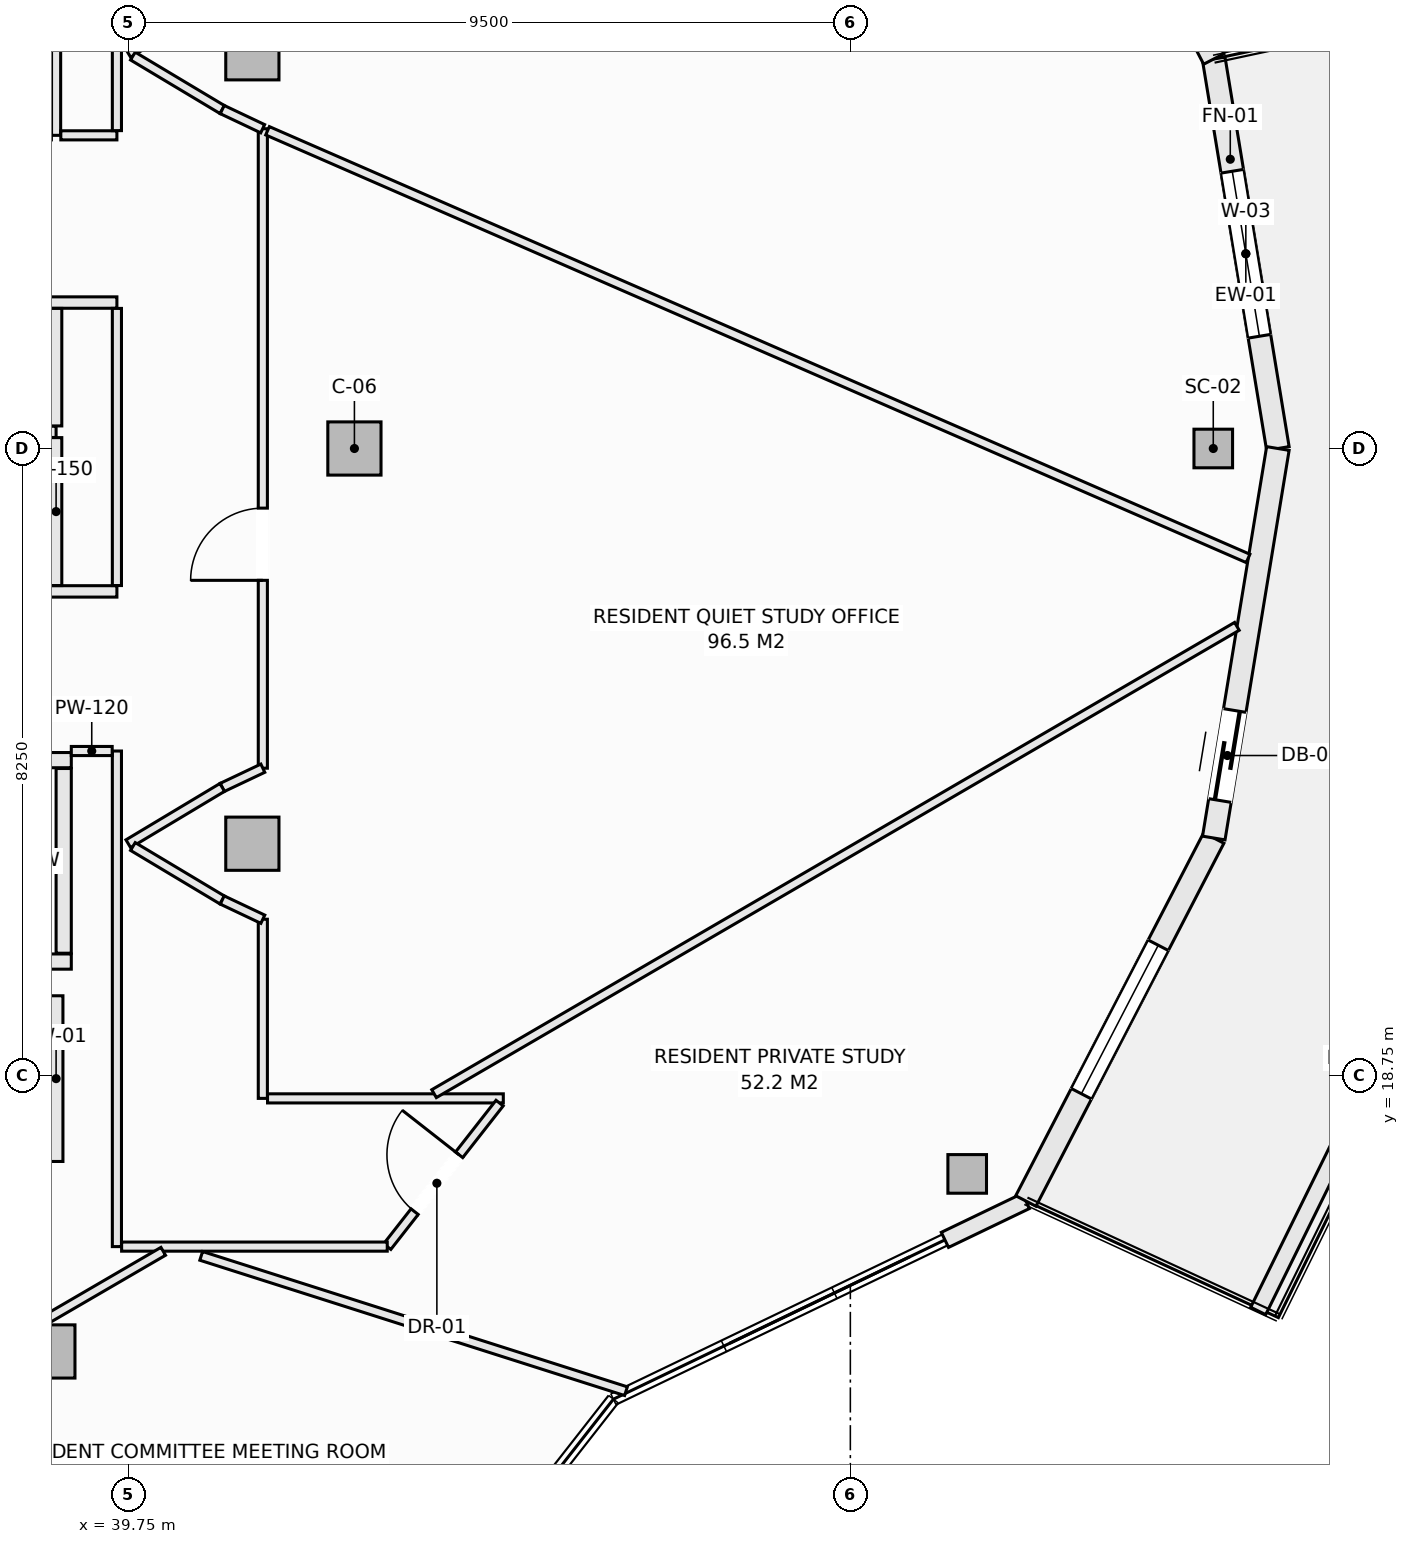
"""IFC4 building model, lengths in metres.
Left out: names, types, materials, properties, quantities, classifications, styles, units other than length and angle.
Written with IfcOpenShell. Run it as: python <this file> out.ifc"""

import sys

from ifc_helpers import new_model, si_unit, direction, frame, frame_2d, origin, origin_2d, place, context, subcontext, project, spatial, rectangle, hollow_rectangle, extrude, element, fill, save


model = new_model("IFC4")
c1 = context("Model", 3, precision=1e-05, world=origin(), true_north=direction((0.0, 1.0)))
c2 = subcontext(c1, "Body", "Model", "MODEL_VIEW")
j1 = project(units=[si_unit("LENGTHUNIT", "METRE"), si_unit("PLANEANGLEUNIT", "RADIAN")], contexts=[c1])
p1 = place(None, origin())
s1 = spatial("IfcSite", under=j1, at=p1, CompositionType="ELEMENT")
p2 = place(p1, origin())
s2 = spatial("IfcBuilding", under=s1, at=p2, CompositionType="ELEMENT")
p3 = place(p2, frame((0.0, 0.0, 226.1)))
s3 = spatial("IfcBuildingStorey", under=s2, at=p3, CompositionType="ELEMENT", Elevation=226.1)
for number, where, z_axis, x_axis in (
    (1, (54.025, 27.0, -0.27), (0.0, 0.0, 1.0), (1.0, 0.0, 0.0)),
    (2, (50.787, 17.456, -0.27), (0.0, 0.0, 1.0), (1.0, 0.0, 0.0)),
):
    element("IfcColumn", number, at=place(p3, frame(where, z_axis=z_axis, x_axis=x_axis)), inside=s3, PredefinedType="COLUMN", context=c2, shape_type="SweptSolid", body=[
        extrude(hollow_rectangle(XDim=0.508, YDim=0.508, WallThickness=0.019, at=origin_2d()), origin(), (0.0, 0.0, 1.0), 3.3),
    ])
for number, where, z_axis, x_axis in (
    (3, (42.725, 27.0, -0.27), (0.0, 0.0, 1.0), (1.0, 0.0, 0.0)),
    (4, (41.382, 32.199, -0.27), (0.0, 0.0, 1.0), (1.0, 0.0, 0.0)),
    (5, (38.698, 15.121, -0.27), (0.0, 0.0, 1.0), (1.0, 0.0, 0.0)),
    (6, (41.382, 21.801, -0.27), (0.0, 0.0, 1.0), (1.0, 0.0, 0.0)),
):
    element("IfcColumn", number, at=place(p3, frame(where, z_axis=z_axis, x_axis=x_axis)), inside=s3, PredefinedType="COLUMN", context=c2, shape_type="SweptSolid", body=[
        extrude(rectangle(XDim=0.7, YDim=0.7, at=origin_2d()), origin(), (0.0, 0.0, 1.0), 3.3),
    ])
p4 = place(p3, frame((54.032, 32.125, 0.0), z_axis=(0.0, 0.0, 1.0), x_axis=(0.16237087798, -0.986729799886, 0.0)))
e7 = element("IfcWall", 7, at=p4, inside=s3, PredefinedType="SOLIDWALL", context=c2, shape_type="SweptSolid", body=[
    extrude(rectangle(XDim=5.193, YDim=0.3, at=frame_2d((2.597, 0.0))), origin(), (0.0, 0.0, 1.0), 2.605),
])
p5 = place(p4, frame((1.497, 0.0, 0.72)))
e8 = element("IfcOpeningElement", 8, at=p5, cuts=e7, PredefinedType="OPENING", context=c2, shape_type="SweptSolid", body=[
    extrude(rectangle(XDim=2.2, YDim=1.65, at=frame_2d((1.1, 0.825))), frame((0.0, 0.16, 0.0), z_axis=(0.0, -1.0, 0.0), x_axis=(1.0, 0.0, 0.0)), (0.0, 0.0, 1.0), 0.32),
])
p6 = place(p3, frame((51.559, 36.9, 0.0), z_axis=(0.0, 0.0, 1.0), x_axis=(0.459808219482, -0.888018243786, 0.0)))
e9 = element("IfcWall", 9, at=p6, inside=s3, PredefinedType="SOLIDWALL", context=c2, shape_type="SweptSolid", body=[
    extrude(rectangle(XDim=5.378, YDim=0.3, at=frame_2d((2.689, 0.0))), origin(), (0.0, 0.0, 1.0), 2.605),
])
p7 = place(p6, frame((1.589, 0.0, 0.72)))
e10 = element("IfcOpeningElement", 10, at=p7, cuts=e9, PredefinedType="OPENING", context=c2, shape_type="SweptSolid", body=[
    extrude(rectangle(XDim=2.2, YDim=1.65, at=frame_2d((1.1, 0.825))), frame((0.0, 0.16, 0.0), z_axis=(0.0, -1.0, 0.0), x_axis=(1.0, 0.0, 0.0)), (0.0, 0.0, 1.0), 0.32),
])
p8 = place(p3, frame((50.494, 16.588, 0.0), z_axis=(0.0, 0.0, 1.0), x_axis=(0.901342408365, 0.433107218692, 0.0)))
e11 = element("IfcWall", 11, at=p8, inside=s3, PredefinedType="SOLIDWALL", context=c2, shape_type="SweptSolid", body=[
    extrude(rectangle(XDim=1.181, YDim=0.22, at=frame_2d((0.591, 0.0))), origin(), (0.0, 0.0, 1.0), 2.605),
])
p9 = place(p3, frame((51.559, 17.1, 0.0), z_axis=(0.0, 0.0, 1.0), x_axis=(0.459808219482, 0.888018243786, 0.0)))
e12 = element("IfcWall", 12, at=p9, inside=s3, PredefinedType="SOLIDWALL", context=c2, shape_type="SweptSolid", body=[
    extrude(rectangle(XDim=5.378, YDim=0.3, at=frame_2d((2.689, 0.0))), origin(), (0.0, 0.0, 1.0), 2.605),
])
p10 = place(p9, frame((1.589, 0.0, 0.72)))
e13 = element("IfcOpeningElement", 13, at=p10, cuts=e12, PredefinedType="OPENING", context=c2, shape_type="SweptSolid", body=[
    extrude(rectangle(XDim=2.2, YDim=1.65, at=frame_2d((1.1, 0.825))), frame((0.0, 0.16, 0.0), z_axis=(0.0, -1.0, 0.0), x_axis=(1.0, 0.0, 0.0)), (0.0, 0.0, 1.0), 0.32),
])
p11 = place(p3, frame((54.032, 21.875, 0.0), z_axis=(0.0, 0.0, 1.0), x_axis=(0.16237087798, 0.986729799886, 0.0)))
e14 = element("IfcWall", 14, at=p11, inside=s3, PredefinedType="SOLIDWALL", context=c2, shape_type="SweptSolid", body=[
    extrude(rectangle(XDim=5.193, YDim=0.3, at=frame_2d((2.597, 0.0))), origin(), (0.0, 0.0, 1.0), 2.605),
])
p12 = place(p11, frame((0.5, 0.0, 0.0)))
e15 = element("IfcOpeningElement", 15, at=p12, cuts=e14, PredefinedType="OPENING", context=c2, shape_type="SweptSolid", body=[
    extrude(rectangle(XDim=1.2, YDim=2.2, at=frame_2d((0.6, 1.1))), frame((0.0, 0.16, 0.0), z_axis=(0.0, -1.0, 0.0), x_axis=(1.0, 0.0, 0.0)), (0.0, 0.0, 1.0), 0.32),
])
p13 = place(p3, frame((54.616, 15.653, 0.0), z_axis=(0.0, 0.0, 1.0), x_axis=(0.441640961804, 0.897191875162, 0.0)))
e16 = element("IfcWall", 16, at=p13, inside=s3, PredefinedType="PARAPET", context=c2, shape_type="SweptSolid", body=[
    extrude(rectangle(XDim=6.178, YDim=0.22, at=frame_2d((3.089, 0.0))), origin(), (0.0, 0.0, 1.0), 0.52),
])
p14 = place(p3, frame((36.75, 22.9, 0.0), z_axis=(0.0, 0.0, 1.0), x_axis=(1.0, 0.0, 0.0)))
e17 = element("IfcWall", 17, at=p14, inside=s3, PredefinedType="SOLIDWALL", context=c2, shape_type="SweptSolid", body=[
    extrude(rectangle(XDim=2.25, YDim=0.2, at=frame_2d((1.125, 0.0))), origin(), (0.0, 0.0, 1.0), 3.03),
])
p15 = place(p14, frame((0.575, 0.0, 0.0)))
e18 = element("IfcOpeningElement", 18, at=p15, cuts=e17, PredefinedType="OPENING", context=c2, shape_type="SweptSolid", body=[
    extrude(rectangle(XDim=1.1, YDim=2.2, at=frame_2d((0.55, 1.1))), frame((0.0, 0.11, 0.0), z_axis=(0.0, -1.0, 0.0), x_axis=(1.0, 0.0, 0.0)), (0.0, 0.0, 1.0), 0.22),
])
p16 = place(p3, frame((36.75, 20.25, 0.0), z_axis=(0.0, 0.0, 1.0), x_axis=(1.0, 0.0, 0.0)))
e19 = element("IfcWall", 19, at=p16, inside=s3, PredefinedType="SOLIDWALL", context=c2, shape_type="SweptSolid", body=[
    extrude(rectangle(XDim=2.25, YDim=0.2, at=frame_2d((1.125, 0.0))), origin(), (0.0, 0.0, 1.0), 3.03),
])
p17 = place(p3, frame((38.9, 20.36, 0.0), z_axis=(0.0, 0.0, 1.0), x_axis=(0.0, 1.0, 0.0)))
e20 = element("IfcWall", 20, at=p17, inside=s3, PredefinedType="SOLIDWALL", context=c2, shape_type="SweptSolid", body=[
    extrude(rectangle(XDim=2.43, YDim=0.2, at=frame_2d((1.215, 0.0))), origin(), (0.0, 0.0, 1.0), 3.03),
])
p18 = place(p3, frame((30.077, 28.92, 0.0), z_axis=(0.0, 0.0, 1.0), x_axis=(1.0, 0.0, 0.0)))
e21 = element("IfcWall", 21, at=p18, inside=s3, PredefinedType="PARTITIONING", context=c2, shape_type="SweptSolid", body=[
    extrude(rectangle(XDim=9.523, YDim=0.15, at=frame_2d((4.762, 0.0))), origin(), (0.0, 0.0, 1.0), 3.03),
])
p19 = place(p18, frame((1.342, 0.0, 0.0)))
e22 = element("IfcOpeningElement", 22, at=p19, cuts=e21, PredefinedType="OPENING", context=c2, shape_type="SweptSolid", body=[
    extrude(rectangle(XDim=0.95, YDim=2.1, at=frame_2d((0.475, 1.05))), frame((0.0, 0.085, 0.0), z_axis=(0.0, -1.0, 0.0), x_axis=(1.0, 0.0, 0.0)), (0.0, 0.0, 1.0), 0.17),
])
p20 = place(p18, frame((5.498, 0.0, 0.0)))
e23 = element("IfcOpeningElement", 23, at=p20, cuts=e21, PredefinedType="OPENING", context=c2, shape_type="SweptSolid", body=[
    extrude(rectangle(XDim=0.95, YDim=2.1, at=frame_2d((0.475, 1.05))), frame((0.0, 0.085, 0.0), z_axis=(0.0, -1.0, 0.0), x_axis=(1.0, 0.0, 0.0)), (0.0, 0.0, 1.0), 0.17),
])
p21 = place(p3, frame((33.377, 25.12, 0.0), z_axis=(0.0, 0.0, 1.0), x_axis=(1.0, 0.0, 0.0)))
e24 = element("IfcWall", 24, at=p21, inside=s3, PredefinedType="PARTITIONING", context=c2, shape_type="SweptSolid", body=[
    extrude(rectangle(XDim=6.223, YDim=0.15, at=frame_2d((3.112, 0.0))), origin(), (0.0, 0.0, 1.0), 3.03),
])
p22 = place(p21, frame((2.441, 0.0, 0.0)))
e25 = element("IfcOpeningElement", 25, at=p22, cuts=e24, PredefinedType="OPENING", context=c2, shape_type="SweptSolid", body=[
    extrude(rectangle(XDim=0.95, YDim=2.1, at=frame_2d((0.475, 1.05))), frame((0.0, 0.085, 0.0), z_axis=(0.0, -1.0, 0.0), x_axis=(1.0, 0.0, 0.0)), (0.0, 0.0, 1.0), 0.17),
])
p23 = place(p3, frame((33.377, 27.22, 0.0), z_axis=(0.0, 0.0, 1.0), x_axis=(1.0, 0.0, 0.0)))
e26 = element("IfcWall", 26, at=p23, inside=s3, PredefinedType="PARTITIONING", context=c2, shape_type="SweptSolid", body=[
    extrude(rectangle(XDim=5.423, YDim=0.15, at=frame_2d((2.711, 0.0))), origin(), (0.0, 0.0, 1.0), 3.03),
])
p24 = place(p3, frame((38.8, 17.62, 0.0), z_axis=(0.0, 0.0, 1.0), x_axis=(0.0, 1.0, 0.0)))
e27 = element("IfcWall", 27, at=p24, inside=s3, PredefinedType="SOLIDWALL", context=c2, shape_type="SweptSolid", body=[
    extrude(rectangle(XDim=2.18, YDim=0.18, at=frame_2d((1.09, 0.0))), origin(), (0.0, 0.0, 1.0), 3.03),
])
p25 = place(p3, frame((38.8, 25.197, 0.0), z_axis=(0.0, 0.0, 1.0), x_axis=(0.0, 1.0, 0.0)))
e28 = element("IfcWall", 28, at=p25, inside=s3, PredefinedType="PARTITIONING", context=c2, shape_type="SweptSolid", body=[
    extrude(rectangle(XDim=1.946, YDim=0.15, at=frame_2d((0.973, 0.0))), origin(), (0.0, 0.0, 1.0), 3.03),
])
p26 = place(p3, frame((38.8, 27.297, 0.0), z_axis=(0.0, 0.0, 1.0), x_axis=(0.0, 1.0, 0.0)))
e29 = element("IfcWall", 29, at=p26, inside=s3, PredefinedType="PARTITIONING", context=c2, shape_type="SweptSolid", body=[
    extrude(rectangle(XDim=1.546, YDim=0.15, at=frame_2d((0.773, 0.0))), origin(), (0.0, 0.0, 1.0), 3.03),
])
p27 = place(p3, frame((38.8, 31.12, 0.0), z_axis=(0.0, 0.0, 1.0), x_axis=(0.0, 1.0, 0.0)))
e30 = element("IfcWall", 30, at=p27, inside=s3, PredefinedType="PARTITIONING", context=c2, shape_type="SweptSolid", body=[
    extrude(rectangle(XDim=2.63, YDim=0.12, at=frame_2d((1.315, 0.0))), origin(), (0.0, 0.0, 1.0), 3.03),
])
p28 = place(p3, frame((38.862, 31.12, 0.0), z_axis=(0.0, 0.0, 1.0), x_axis=(1.0, 0.0, 0.0)))
e31 = element("IfcWall", 31, at=p28, inside=s3, PredefinedType="PARTITIONING", context=c2, shape_type="SweptSolid", body=[
    extrude(rectangle(XDim=0.738, YDim=0.12, at=frame_2d((0.369, 0.0))), origin(), (0.0, 0.0, 1.0), 3.03),
])
p29 = place(p3, frame((39.6, 16.5, 0.0), z_axis=(0.0, 0.0, 1.0), x_axis=(0.0, 1.0, 0.0)))
e32 = element("IfcWall", 32, at=p29, inside=s3, PredefinedType="PARTITIONING", context=c2, shape_type="SweptSolid", body=[
    extrude(rectangle(XDim=6.52, YDim=0.12, at=frame_2d((3.26, 0.0))), origin(), (0.0, 0.0, 1.0), 2.478),
])
p30 = place(p3, frame((39.6, 25.197, 0.0), z_axis=(0.0, 0.0, 1.0), x_axis=(0.0, 1.0, 0.0)))
e33 = element("IfcWall", 33, at=p30, inside=s3, PredefinedType="PARTITIONING", context=c2, shape_type="SweptSolid", body=[
    extrude(rectangle(XDim=3.646, YDim=0.12, at=frame_2d((1.823, 0.0))), origin(), (0.0, 0.0, 1.0), 3.03),
])
p31 = place(p3, frame((39.6, 31.182, 0.0), z_axis=(0.0, 0.0, 1.0), x_axis=(0.0, 1.0, 0.0)))
e34 = element("IfcWall", 34, at=p31, inside=s3, PredefinedType="PARTITIONING", context=c2, shape_type="SweptSolid", body=[
    extrude(rectangle(XDim=6.318, YDim=0.12, at=frame_2d((3.159, 0.0))), origin(), (0.0, 0.0, 1.0), 3.03),
])
p32 = place(p3, frame((41.52, 18.45, 0.0), z_axis=(0.0, 0.0, 1.0), x_axis=(0.0, 1.0, 0.0)))
e35 = element("IfcWall", 35, at=p32, inside=s3, PredefinedType="PARTITIONING", context=c2, shape_type="SweptSolid", body=[
    extrude(rectangle(XDim=2.357, YDim=0.12, at=frame_2d((1.178, 0.0))), origin(), (0.0, 0.0, 1.0), 3.03),
])
p33 = place(p3, frame((41.52, 22.794, 0.0), z_axis=(0.0, 0.0, 1.0), x_axis=(0.0, 1.0, 0.0)))
e36 = element("IfcWall", 36, at=p33, inside=s3, PredefinedType="PARTITIONING", context=c2, shape_type="SweptSolid", body=[
    extrude(rectangle(XDim=8.413, YDim=0.12, at=frame_2d((4.207, 0.0))), origin(), (0.0, 0.0, 1.0), 2.478),
])
p34 = place(p33, frame((2.471, 0.0, 0.0)))
e37 = element("IfcOpeningElement", 37, at=p34, cuts=e36, PredefinedType="OPENING", context=c2, shape_type="SweptSolid", body=[
    extrude(rectangle(XDim=0.95, YDim=2.1, at=frame_2d((0.475, 1.05))), frame((0.0, 0.07, 0.0), z_axis=(0.0, -1.0, 0.0), x_axis=(1.0, 0.0, 0.0)), (0.0, 0.0, 1.0), 0.14),
])
p35 = place(p3, frame((39.75, 32.199, 0.0), z_axis=(0.0, 0.0, 1.0), x_axis=(0.857702120906, 0.514146935996, 0.0)))
e38 = element("IfcWall", 38, at=p35, inside=s3, PredefinedType="PARTITIONING", context=c2, shape_type="SweptSolid", body=[
    extrude(rectangle(XDim=1.441, YDim=0.12, at=frame_2d((0.721, 0.0))), origin(), (0.0, 0.0, 1.0), 3.03),
])
p36 = place(p3, frame((39.81, 32.163, 0.0), z_axis=(0.0, 0.0, 1.0), x_axis=(0.858011245414, -0.513630901273, 0.0)))
e39 = element("IfcWall", 39, at=p36, inside=s3, PredefinedType="PARTITIONING", context=c2, shape_type="SweptSolid", body=[
    extrude(rectangle(XDim=1.37, YDim=0.12, at=frame_2d((0.685, 0.0))), origin(), (0.0, 0.0, 1.0), 3.03),
])
p37 = place(p3, frame((40.986, 31.459, 0.0), z_axis=(0.0, 0.0, 1.0), x_axis=(0.903687141457, -0.428193356283, 0.0)))
e40 = element("IfcWall", 40, at=p37, inside=s3, PredefinedType="PARTITIONING", context=c2, shape_type="SweptSolid", body=[
    extrude(rectangle(XDim=0.588, YDim=0.12, at=frame_2d((0.294, 0.0))), origin(), (0.0, 0.0, 1.0), 3.03),
])
p38 = place(p3, frame((40.986, 22.541, 0.0), z_axis=(0.0, 0.0, 1.0), x_axis=(0.903729424576, 0.428104107847, 0.0)))
e41 = element("IfcWall", 41, at=p38, inside=s3, PredefinedType="PARTITIONING", context=c2, shape_type="SweptSolid", body=[
    extrude(rectangle(XDim=0.591, YDim=0.12, at=frame_2d((0.295, 0.0))), origin(), (0.0, 0.0, 1.0), 3.03),
])
p39 = place(p3, frame((39.75, 21.8, 0.0), z_axis=(0.0, 0.0, 1.0), x_axis=(0.857702120906, 0.514146935996, 0.0)))
e42 = element("IfcWall", 42, at=p39, inside=s3, PredefinedType="PARTITIONING", context=c2, shape_type="SweptSolid", body=[
    extrude(rectangle(XDim=1.441, YDim=0.12, at=frame_2d((0.721, 0.0))), origin(), (0.0, 0.0, 1.0), 3.03),
])
p40 = place(p3, frame((39.81, 21.764, 0.0), z_axis=(0.0, 0.0, 1.0), x_axis=(0.858011245414, -0.513630901273, 0.0)))
e43 = element("IfcWall", 43, at=p40, inside=s3, PredefinedType="PARTITIONING", context=c2, shape_type="SweptSolid", body=[
    extrude(rectangle(XDim=1.37, YDim=0.12, at=frame_2d((0.685, 0.0))), origin(), (0.0, 0.0, 1.0), 3.03),
])
p41 = place(p3, frame((40.986, 21.06, 0.0), z_axis=(0.0, 0.0, 1.0), x_axis=(0.90356951601, -0.428441512621, 0.0)))
e44 = element("IfcWall", 44, at=p41, inside=s3, PredefinedType="PARTITIONING", context=c2, shape_type="SweptSolid", body=[
    extrude(rectangle(XDim=0.591, YDim=0.12, at=frame_2d((0.295, 0.0))), origin(), (0.0, 0.0, 1.0), 3.03),
])
p42 = place(p3, frame((41.582, 18.45, 0.0), z_axis=(0.0, 0.0, 1.0), x_axis=(1.0, 0.0, 0.0)))
e45 = element("IfcWall", 45, at=p42, inside=s3, PredefinedType="PARTITIONING", context=c2, shape_type="SweptSolid", body=[
    extrude(rectangle(XDim=3.102, YDim=0.12, at=frame_2d((1.551, 0.0))), origin(), (0.0, 0.0, 1.0), 3.03),
])
p43 = place(p3, frame((43.157, 16.5, 0.0), z_axis=(0.0, 0.0, 1.0), x_axis=(0.616566276607, 0.787303008092, 0.0)))
e46 = element("IfcWall", 46, at=p43, inside=s3, PredefinedType="PARTITIONING", context=c2, shape_type="SweptSolid", body=[
    extrude(rectangle(XDim=2.398, YDim=0.12, at=frame_2d((1.199, 0.0))), origin(), (0.0, 0.0, 1.0), 3.03),
])
p44 = place(p43, frame((0.584, 0.0, 0.0)))
e47 = element("IfcOpeningElement", 47, at=p44, cuts=e46, PredefinedType="OPENING", context=c2, shape_type="SweptSolid", body=[
    extrude(rectangle(XDim=0.95, YDim=2.1, at=frame_2d((0.475, 1.05))), frame((0.0, 0.07, 0.0), z_axis=(0.0, -1.0, 0.0), x_axis=(1.0, 0.0, 0.0)), (0.0, 0.0, 1.0), 0.14),
])
p45 = place(p3, frame((39.662, 16.5, 0.0), z_axis=(0.0, 0.0, 1.0), x_axis=(1.0, 0.0, 0.0)))
e48 = element("IfcWall", 48, at=p45, inside=s3, PredefinedType="PARTITIONING", context=c2, shape_type="SweptSolid", body=[
    extrude(rectangle(XDim=3.495, YDim=0.12, at=frame_2d((1.748, 0.0))), origin(), (0.0, 0.0, 1.0), 2.77),
])
p46 = place(p3, frame((39.0, 23.02, 0.0), z_axis=(0.0, 0.0, 1.0), x_axis=(1.0, 0.0, 0.0)))
e49 = element("IfcWall", 49, at=p46, inside=s3, PredefinedType="PARTITIONING", context=c2, shape_type="SweptSolid", body=[
    extrude(rectangle(XDim=0.538, YDim=0.12, at=frame_2d((0.269, 0.0))), origin(), (0.0, 0.0, 1.0), 3.03),
])
p47 = place(p3, frame((36.012, 13.995, 0.0), z_axis=(0.0, 0.0, 1.0), x_axis=(0.864278013608, 0.503014428415, 0.0)))
e50 = element("IfcWall", 50, at=p47, inside=s3, PredefinedType="PARTITIONING", context=c2, shape_type="SweptSolid", body=[
    extrude(rectangle(XDim=4.857, YDim=0.12, at=frame_2d((2.428, 0.0))), origin(), (0.0, 0.0, 1.0), 2.478),
])
p48 = place(p3, frame((43.773, 18.512, 0.0), z_axis=(0.0, 0.0, 1.0), x_axis=(0.864261022419, 0.503043621495, 0.0)))
e51 = element("IfcWall", 51, at=p48, inside=s3, PredefinedType="PARTITIONING", context=c2, shape_type="SweptSolid", body=[
    extrude(rectangle(XDim=12.222, YDim=0.12, at=frame_2d((6.111, 0.0))), origin(), (0.0, 0.0, 1.0), 3.03),
])
p49 = place(p3, frame((40.709, 16.378, 0.0), z_axis=(0.0, 0.0, 1.0), x_axis=(0.952839371161, -0.303475094144, 0.0)))
e52 = element("IfcWall", 52, at=p49, inside=s3, PredefinedType="PARTITIONING", context=c2, shape_type="SweptSolid", body=[
    extrude(rectangle(XDim=5.865, YDim=0.12, at=frame_2d((2.933, 0.0))), origin(), (0.0, 0.0, 1.0), 2.77),
])
p50 = place(p3, frame((41.582, 31.18, 0.0), z_axis=(0.0, 0.0, 1.0), x_axis=(0.916624100851, -0.399750244202, 0.0)))
e53 = element("IfcWall", 53, at=p50, inside=s3, PredefinedType="PARTITIONING", context=c2, shape_type="SweptSolid", body=[
    extrude(rectangle(XDim=14.074, YDim=0.12, at=frame_2d((7.037, 0.0))), origin(), (0.0, 0.0, 1.0), 2.478),
])
p51 = place(p5, origin())
e54 = element("IfcWindow", 54, at=p51, inside=s3, PartitioningType="SINGLE_PANEL", PredefinedType="WINDOW", context=c2, shape_type="SweptSolid", body=[
    extrude(rectangle(XDim=2.2, YDim=1.65, at=frame_2d((1.1, 0.825))), frame((0.0, 0.03, 0.0), z_axis=(0.0, -1.0, 0.0), x_axis=(1.0, 0.0, 0.0)), (0.0, 0.0, 1.0), 0.06),
])
fill(e8, e54)
p52 = place(p10, origin())
e55 = element("IfcWindow", 55, at=p52, inside=s3, PartitioningType="SINGLE_PANEL", PredefinedType="WINDOW", context=c2, shape_type="SweptSolid", body=[
    extrude(rectangle(XDim=2.2, YDim=1.65, at=frame_2d((1.1, 0.825))), frame((0.0, 0.03, 0.0), z_axis=(0.0, -1.0, 0.0), x_axis=(1.0, 0.0, 0.0)), (0.0, 0.0, 1.0), 0.06),
])
fill(e13, e55)
p53 = place(p12, frame((1.2, 0.0, 0.0), z_axis=(0.0, 0.0, 1.0), x_axis=(-1.0, 0.0, 0.0)))
e56 = element("IfcDoor", 56, at=p53, inside=s3, OperationType="SLIDING_TO_LEFT", PredefinedType="DOOR", context=c2, shape_type="SweptSolid", body=[
    extrude(rectangle(XDim=1.2, YDim=2.2, at=frame_2d((0.6, 1.1))), frame((0.0, 0.025, 0.0), z_axis=(0.0, -1.0, 0.0), x_axis=(1.0, 0.0, 0.0)), (0.0, 0.0, 1.0), 0.05),
])
fill(e15, e56)
p54 = place(p44, origin())
e57 = element("IfcDoor", 57, at=p54, inside=s3, OperationType="SINGLE_SWING_RIGHT", PredefinedType="DOOR", context=c2, shape_type="SweptSolid", body=[
    extrude(rectangle(XDim=0.95, YDim=2.1, at=frame_2d((0.475, 1.05))), frame((0.0, 0.025, 0.0), z_axis=(0.0, -1.0, 0.0), x_axis=(1.0, 0.0, 0.0)), (0.0, 0.0, 1.0), 0.05),
])
fill(e47, e57)
p55 = place(p34, origin())
e58 = element("IfcDoor", 58, at=p55, inside=s3, OperationType="SINGLE_SWING_LEFT", PredefinedType="DOOR", context=c2, shape_type="SweptSolid", body=[
    extrude(rectangle(XDim=0.95, YDim=2.1, at=frame_2d((0.475, 1.05))), frame((0.0, 0.025, 0.0), z_axis=(0.0, -1.0, 0.0), x_axis=(1.0, 0.0, 0.0)), (0.0, 0.0, 1.0), 0.05),
])
fill(e37, e58)
save(model, sys.argv[1])
